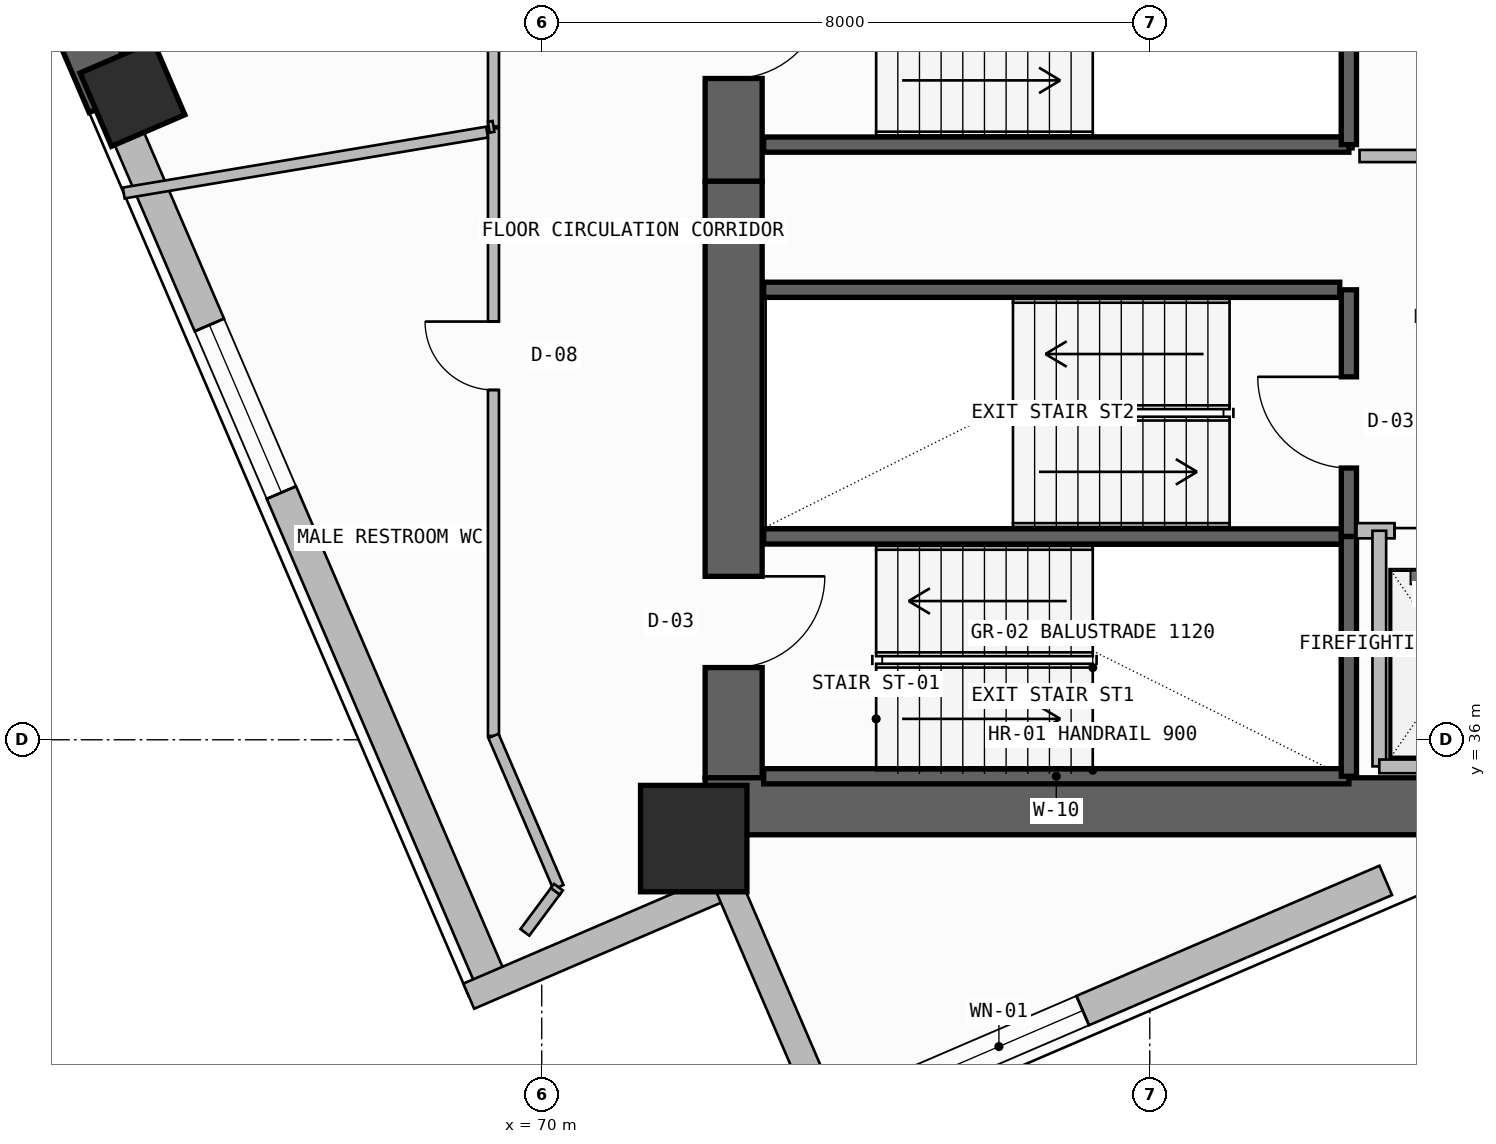
"""IFC4 building model, lengths in metres.
Left out: names, types, materials, properties, quantities, classifications, styles, units other than length and angle.
Written with IfcOpenShell. Run it as: python <this file> out.ifc"""

import sys

from ifc_helpers import new_model, si_unit, direction, frame, frame_2d, origin, origin_2d, place, context, subcontext, project, spatial, rectangle, extrude, element, fill, save


model = new_model("IFC4")
c1 = context("Model", 3, precision=1e-05, world=origin(), true_north=direction((0.0, 1.0)))
c2 = subcontext(c1, "Body", "Model", "MODEL_VIEW")
j1 = project(units=[si_unit("LENGTHUNIT", "METRE"), si_unit("PLANEANGLEUNIT", "RADIAN")], contexts=[c1])
p1 = place(None, origin())
s1 = spatial("IfcSite", under=j1, at=p1, CompositionType="ELEMENT")
p2 = place(p1, origin())
s2 = spatial("IfcBuilding", under=s1, at=p2, CompositionType="ELEMENT")
p3 = place(p2, frame((0.0, 0.0, 175.5)))
s3 = spatial("IfcBuildingStorey", under=s2, at=p3, CompositionType="ELEMENT", Elevation=175.5)
p4 = place(p3, frame((72.525, 35.5, -0.26), z_axis=(0.0, 0.0, 1.0), x_axis=(0.0, 1.0, 0.0)))
e1 = element("IfcWall", 1, at=p4, inside=s3, PredefinedType="SHEAR", context=c2, shape_type="SweptSolid", body=[
    extrude(rectangle(XDim=7.85, YDim=0.75, at=frame_2d((3.925, 0.0))), origin(), (0.0, 0.0, 1.0), 3.6),
])
p5 = place(p4, frame((1.45, 0.0, 0.26)))
e2 = element("IfcOpeningElement", 2, at=p5, cuts=e1, PredefinedType="OPENING", context=c2, shape_type="SweptSolid", body=[
    extrude(rectangle(XDim=1.2, YDim=2.2, at=frame_2d((0.6, 1.1))), frame((0.0, 0.385, 0.0), z_axis=(0.0, -1.0, 0.0), x_axis=(1.0, 0.0, 0.0)), (0.0, 0.0, 1.0), 0.77),
])
p6 = place(p3, frame((72.15, 35.125, -0.26), z_axis=(0.0, 0.0, 1.0), x_axis=(1.0, 0.0, 0.0)))
e3 = element("IfcWall", 3, at=p6, inside=s3, PredefinedType="SHEAR", context=c2, shape_type="SweptSolid", body=[
    extrude(rectangle(XDim=13.6, YDim=0.75, at=frame_2d((6.8, 0.0))), origin(), (0.0, 0.0, 1.0), 3.6),
])
p7 = place(p3, frame((72.525, 43.35, -0.26), z_axis=(0.0, 0.0, 1.0), x_axis=(0.0, 1.0, 0.0)))
e4 = element("IfcWall", 4, at=p7, inside=s3, PredefinedType="SHEAR", context=c2, shape_type="SweptSolid", body=[
    extrude(rectangle(XDim=12.7, YDim=0.75, at=frame_2d((6.35, 0.0))), origin(), (0.0, 0.0, 1.0), 3.6),
])
p8 = place(p7, frame((1.35, 0.0, 0.26)))
e5 = element("IfcOpeningElement", 5, at=p8, cuts=e4, PredefinedType="OPENING", context=c2, shape_type="SweptSolid", body=[
    extrude(rectangle(XDim=1.2, YDim=2.2, at=frame_2d((0.6, 1.1))), frame((0.0, 0.385, 0.0), z_axis=(0.0, -1.0, 0.0), x_axis=(1.0, 0.0, 0.0)), (0.0, 0.0, 1.0), 0.77),
])
p9 = place(p3, frame((72.0, 34.7, 0.0), z_axis=(0.0, 0.0, 1.0), x_axis=(1.0, 0.0, 0.0)))
e6 = element("IfcColumn", 6, at=p9, inside=s3, PredefinedType="COLUMN", context=c2, shape_type="SweptSolid", body=[
    extrude(rectangle(XDim=1.4, YDim=1.4, at=origin_2d()), origin(), (0.0, 0.0, 1.0), 3.6),
])
p10 = place(p3, frame((64.615, 44.498, 0.0), z_axis=(0.0, 0.0, 1.0), x_axis=(-0.394743856384, 0.918791210149, 0.0)))
e7 = element("IfcColumn", 7, at=p10, inside=s3, PredefinedType="COLUMN", context=c2, shape_type="SweptSolid", body=[
    extrude(rectangle(XDim=1.05, YDim=1.05, at=origin_2d()), origin(), (0.0, 0.0, 1.0), 3.6),
])
p11 = place(p3, frame((73.779, 31.003, 0.0), z_axis=(0.0, 0.0, 1.0), x_axis=(0.918797817688, 0.394728476565, 0.0)))
e8 = element("IfcWall", 8, at=p11, inside=s3, PredefinedType="SOLIDWALL", context=c2, shape_type="SweptSolid", body=[
    extrude(rectangle(XDim=7.973, YDim=0.42, at=frame_2d((3.987, 0.0))), origin(), (0.0, 0.0, 1.0), 3.34),
])
p12 = place(p11, frame((1.234, 0.0, 1.2)))
e9 = element("IfcOpeningElement", 9, at=p12, cuts=e8, PredefinedType="OPENING", context=c2, shape_type="SweptSolid", body=[
    extrude(rectangle(XDim=2.4, YDim=0.9, at=frame_2d((1.2, 0.45))), frame((0.0, 0.22, 0.0), z_axis=(0.0, -1.0, 0.0), x_axis=(1.0, 0.0, 0.0)), (0.0, 0.0, 1.0), 0.44),
])
p13 = place(p3, frame((56.728, 62.172, -0.26), z_axis=(0.0, 0.0, 1.0), x_axis=(0.394736752992, -0.918794261974, 0.0)))
e10 = element("IfcWall", 10, at=p13, inside=s3, PredefinedType="SHEAR", context=c2, shape_type="SweptSolid", body=[
    extrude(rectangle(XDim=19.353, YDim=0.7, at=frame_2d((9.676, 0.0))), origin(), (0.0, 0.0, 1.0), 3.6),
])
p14 = place(p13, frame((7.747, 0.0, 1.2)))
e11 = element("IfcOpeningElement", 11, at=p14, cuts=e10, PredefinedType="OPENING", context=c2, shape_type="SweptSolid", body=[
    extrude(rectangle(XDim=2.4, YDim=0.9, at=frame_2d((1.2, 0.45))), frame((0.0, 0.36, 0.0), z_axis=(0.0, -1.0, 0.0), x_axis=(1.0, 0.0, 0.0)), (0.0, 0.0, 1.0), 0.72),
])
p15 = place(p3, frame((64.367, 44.391, 0.0), z_axis=(0.0, 0.0, 1.0), x_axis=(0.394757430431, -0.918785378159, 0.0)))
e12 = element("IfcWall", 12, at=p15, inside=s3, PredefinedType="SOLIDWALL", context=c2, shape_type="SweptSolid", body=[
    extrude(rectangle(XDim=12.654, YDim=0.42, at=frame_2d((6.327, 0.0))), origin(), (0.0, 0.0, 1.0), 2.725),
])
p16 = place(p15, frame((3.193, 0.0, 1.2)))
e13 = element("IfcOpeningElement", 13, at=p16, cuts=e12, PredefinedType="OPENING", context=c2, shape_type="SweptSolid", body=[
    extrude(rectangle(XDim=2.4, YDim=0.9, at=frame_2d((1.2, 0.45))), frame((0.0, 0.22, 0.0), z_axis=(0.0, -1.0, 0.0), x_axis=(1.0, 0.0, 0.0)), (0.0, 0.0, 1.0), 0.44),
])
p17 = place(p3, frame((69.04, 32.627, 0.0), z_axis=(0.0, 0.0, 1.0), x_axis=(0.91879775808, 0.394728615312, 0.0)))
e14 = element("IfcWall", 14, at=p17, inside=s3, PredefinedType="SOLIDWALL", context=c2, shape_type="SweptSolid", body=[
    extrude(rectangle(XDim=3.713, YDim=0.36, at=frame_2d((1.856, 0.0))), origin(), (0.0, 0.0, 1.0), 3.34),
])
p18 = place(p3, frame((72.451, 34.092, 0.0), z_axis=(0.0, 0.0, 1.0), x_axis=(0.394752464447, -0.918787511786, 0.0)))
e15 = element("IfcWall", 15, at=p18, inside=s3, PredefinedType="SOLIDWALL", context=c2, shape_type="SweptSolid", body=[
    extrude(rectangle(XDim=3.713, YDim=0.36, at=frame_2d((1.856, 0.0))), origin(), (0.0, 0.0, 1.0), 3.34),
])
for number, where, z_axis, x_axis in (
    (16, (72.92, 35.52, -0.26), (0.0, 0.0, 1.0), (1.0, 0.0, 0.0)),
    (17, (72.92, 38.675, -0.26), (0.0, 0.0, 1.0), (1.0, 0.0, 0.0)),
):
    element("IfcWall", number, at=place(p3, frame(where, z_axis=z_axis, x_axis=x_axis)), inside=s3, PredefinedType="SOLIDWALL", context=c2, shape_type="SweptSolid", body=[
        extrude(rectangle(XDim=7.7, YDim=0.2, at=frame_2d((3.85, 0.0))), origin(), (0.0, 0.0, 1.0), 3.6),
    ])
p19 = place(p3, frame((80.62, 35.52, -0.26), z_axis=(0.0, 0.0, 1.0), x_axis=(0.0, 1.0, 0.0)))
e18 = element("IfcWall", 18, at=p19, inside=s3, PredefinedType="SOLIDWALL", context=c2, shape_type="SweptSolid", body=[
    extrude(rectangle(XDim=3.155, YDim=0.2, at=frame_2d((1.578, 0.0))), origin(), (0.0, 0.0, 1.0), 3.6),
])
p20 = place(p3, frame((80.62, 38.675, -0.26), z_axis=(0.0, 0.0, 1.0), x_axis=(0.0, 1.0, 0.0)))
e19 = element("IfcWall", 19, at=p20, inside=s3, PredefinedType="SOLIDWALL", context=c2, shape_type="SweptSolid", body=[
    extrude(rectangle(XDim=3.245, YDim=0.2, at=frame_2d((1.623, 0.0))), origin(), (0.0, 0.0, 1.0), 3.6),
])
p21 = place(p20, frame((0.9, 0.0, 0.26)))
e20 = element("IfcOpeningElement", 20, at=p21, cuts=e19, PredefinedType="OPENING", context=c2, shape_type="SweptSolid", body=[
    extrude(rectangle(XDim=1.2, YDim=2.2, at=frame_2d((0.6, 1.1))), frame((0.0, 0.11, 0.0), z_axis=(0.0, -1.0, 0.0), x_axis=(1.0, 0.0, 0.0)), (0.0, 0.0, 1.0), 0.22),
])
p22 = place(p3, frame((80.72, 38.75, 0.0), z_axis=(0.0, 0.0, 1.0), x_axis=(1.0, 0.0, 0.0)))
e21 = element("IfcWall", 21, at=p22, inside=s3, PredefinedType="SOLIDWALL", context=c2, shape_type="SweptSolid", body=[
    extrude(rectangle(XDim=4.26, YDim=0.2, at=frame_2d((2.13, 0.0))), origin(), (0.0, 0.0, 1.0), 3.34),
])
p23 = place(p22, frame((0.5, 0.0, 0.0)))
e22 = element("IfcOpeningElement", 22, at=p23, cuts=e21, PredefinedType="OPENING", context=c2, shape_type="SweptSolid", body=[
    extrude(rectangle(XDim=1.3, YDim=2.3, at=frame_2d((0.65, 1.15))), frame((0.0, 0.11, 0.0), z_axis=(0.0, -1.0, 0.0), x_axis=(1.0, 0.0, 0.0)), (0.0, 0.0, 1.0), 0.22),
])
p24 = place(p22, frame((2.45, 0.0, 0.0)))
e23 = element("IfcOpeningElement", 23, at=p24, cuts=e21, PredefinedType="OPENING", context=c2, shape_type="SweptSolid", body=[
    extrude(rectangle(XDim=1.3, YDim=2.3, at=frame_2d((0.65, 1.15))), frame((0.0, 0.11, 0.0), z_axis=(0.0, -1.0, 0.0), x_axis=(1.0, 0.0, 0.0)), (0.0, 0.0, 1.0), 0.22),
])
p25 = place(p3, frame((81.02, 35.65, 0.0), z_axis=(0.0, 0.0, 1.0), x_axis=(0.0, 1.0, 0.0)))
e24 = element("IfcWall", 24, at=p25, inside=s3, PredefinedType="SOLIDWALL", context=c2, shape_type="SweptSolid", body=[
    extrude(rectangle(XDim=3.1, YDim=0.18, at=frame_2d((1.55, 0.0))), origin(), (0.0, 0.0, 1.0), 3.34),
])
p26 = place(p3, frame((81.02, 35.65, 0.0), z_axis=(0.0, 0.0, 1.0), x_axis=(1.0, 0.0, 0.0)))
e25 = element("IfcWall", 25, at=p26, inside=s3, PredefinedType="SOLIDWALL", context=c2, shape_type="SweptSolid", body=[
    extrude(rectangle(XDim=3.93, YDim=0.18, at=frame_2d((1.965, 0.0))), origin(), (0.0, 0.0, 1.0), 3.34),
])
p27 = place(p3, frame((72.92, 41.92, -0.26), z_axis=(0.0, 0.0, 1.0), x_axis=(1.0, 0.0, 0.0)))
e26 = element("IfcWall", 26, at=p27, inside=s3, PredefinedType="SOLIDWALL", context=c2, shape_type="SweptSolid", body=[
    extrude(rectangle(XDim=7.58, YDim=0.2, at=frame_2d((3.79, 0.0))), origin(), (0.0, 0.0, 1.0), 3.6),
])
p28 = place(p3, frame((72.92, 43.83, -0.26), z_axis=(0.0, 0.0, 1.0), x_axis=(1.0, 0.0, 0.0)))
e27 = element("IfcWall", 27, at=p28, inside=s3, PredefinedType="SOLIDWALL", context=c2, shape_type="SweptSolid", body=[
    extrude(rectangle(XDim=7.7, YDim=0.2, at=frame_2d((3.85, 0.0))), origin(), (0.0, 0.0, 1.0), 3.6),
])
p29 = place(p3, frame((80.62, 43.83, -0.26), z_axis=(0.0, 0.0, 1.0), x_axis=(0.0, 1.0, 0.0)))
e28 = element("IfcWall", 28, at=p29, inside=s3, PredefinedType="SOLIDWALL", context=c2, shape_type="SweptSolid", body=[
    extrude(rectangle(XDim=3.24, YDim=0.2, at=frame_2d((1.62, 0.0))), origin(), (0.0, 0.0, 1.0), 3.6),
])
p30 = place(p3, frame((80.76, 43.68, 0.0), z_axis=(0.0, 0.0, 1.0), x_axis=(1.0, 0.0, 0.0)))
e29 = element("IfcWall", 29, at=p30, inside=s3, PredefinedType="PLUMBINGWALL", context=c2, shape_type="SweptSolid", body=[
    extrude(rectangle(XDim=4.19, YDim=0.16, at=frame_2d((2.095, 0.0))), origin(), (0.0, 0.0, 1.0), 3.34),
])
p31 = place(p3, frame((69.365, 44.045, 0.0), z_axis=(0.0, 0.0, 1.0), x_axis=(0.0, -1.0, 0.0)))
e30 = element("IfcWall", 30, at=p31, inside=s3, PredefinedType="PARTITIONING", context=c2, shape_type="SweptSolid", body=[
    extrude(rectangle(XDim=7.995, YDim=0.145, at=frame_2d((3.997, 0.0))), origin(), (0.0, 0.0, 1.0), 3.34),
])
p32 = place(p31, frame((2.543, 0.0, 0.0)))
e31 = element("IfcOpeningElement", 31, at=p32, cuts=e30, PredefinedType="OPENING", context=c2, shape_type="SweptSolid", body=[
    extrude(rectangle(XDim=0.9, YDim=2.1, at=frame_2d((0.45, 1.05))), frame((0.0, 0.083, 0.0), z_axis=(0.0, -1.0, 0.0), x_axis=(1.0, 0.0, 0.0)), (0.0, 0.0, 1.0), 0.165),
])
p33 = place(p3, frame((69.365, 36.051, 0.0), z_axis=(0.0, 0.0, 1.0), x_axis=(0.394735604248, -0.918794755503, 0.0)))
e32 = element("IfcWall", 32, at=p33, inside=s3, PredefinedType="PARTITIONING", context=c2, shape_type="SweptSolid", body=[
    extrude(rectangle(XDim=2.165, YDim=0.145, at=frame_2d((1.083, 0.0))), origin(), (0.0, 0.0, 1.0), 3.34),
])
p34 = place(p3, frame((70.22, 34.061, 0.0), z_axis=(0.0, 0.0, 1.0), x_axis=(-0.595480318094, -0.8033698966, 0.0)))
e33 = element("IfcWall", 33, at=p34, inside=s3, PredefinedType="PARTITIONING", context=c2, shape_type="SweptSolid", body=[
    extrude(rectangle(XDim=0.069, YDim=0.145, at=frame_2d((0.035, 0.0))), origin(), (0.0, 0.0, 1.0), 3.34),
])
p35 = place(p3, frame((64.5, 43.194, 0.0), z_axis=(0.0, 0.0, 1.0), x_axis=(0.986257448723, 0.165215752391, 0.0)))
e34 = element("IfcWall", 34, at=p35, inside=s3, PredefinedType="PARTITIONING", context=c2, shape_type="SweptSolid", body=[
    extrude(rectangle(XDim=4.847, YDim=0.145, at=frame_2d((2.423, 0.0))), origin(), (0.0, 0.0, 1.0), 3.34),
])
p36 = place(p3, frame((69.365, 48.265, 0.0), z_axis=(0.0, 0.0, 1.0), x_axis=(0.0, -1.0, 0.0)))
e35 = element("IfcWall", 35, at=p36, inside=s3, PredefinedType="PARTITIONING", context=c2, shape_type="SweptSolid", body=[
    extrude(rectangle(XDim=4.195, YDim=0.145, at=frame_2d((2.098, 0.0))), origin(), (0.0, 0.0, 1.0), 3.34),
])
p37 = place(p36, frame((1.648, 0.0, 0.0)))
e36 = element("IfcOpeningElement", 36, at=p37, cuts=e35, PredefinedType="OPENING", context=c2, shape_type="SweptSolid", body=[
    extrude(rectangle(XDim=0.9, YDim=2.1, at=frame_2d((0.45, 1.05))), frame((0.0, 0.083, 0.0), z_axis=(0.0, -1.0, 0.0), x_axis=(1.0, 0.0, 0.0)), (0.0, 0.0, 1.0), 0.165),
])
p38 = place(p3, frame((69.365, 44.069, 0.0), z_axis=(0.0, 0.0, 1.0), x_axis=(-0.987036848987, -0.160493796583, 0.0)))
e37 = element("IfcWall", 37, at=p38, inside=s3, PredefinedType="PARTITIONING", context=c2, shape_type="SweptSolid", body=[
    extrude(rectangle(XDim=0.061, YDim=0.145, at=frame_2d((0.03, 0.0))), origin(), (0.0, 0.0, 1.0), 3.34),
])
p39 = place(p3, frame((70.178, 34.005, 0.0), z_axis=(0.0, 0.0, 1.0), x_axis=(-0.596036058809, -0.802957667999, 0.0)))
e38 = element("IfcWall", 38, at=p39, inside=s3, PredefinedType="PARTITIONING", context=c2, shape_type="SweptSolid", body=[
    extrude(rectangle(XDim=0.671, YDim=0.145, at=frame_2d((0.336, 0.0))), origin(), (0.0, 0.0, 1.0), 3.34),
])
p40 = place(p12, origin())
e39 = element("IfcWindow", 39, at=p40, inside=s3, PartitioningType="SINGLE_PANEL", PredefinedType="WINDOW", context=c2, shape_type="SweptSolid", body=[
    extrude(rectangle(XDim=2.4, YDim=0.9, at=frame_2d((1.2, 0.45))), frame((0.0, 0.03, 0.0), z_axis=(0.0, -1.0, 0.0), x_axis=(1.0, 0.0, 0.0)), (0.0, 0.0, 1.0), 0.06),
])
fill(e9, e39)
p41 = place(p16, origin())
e40 = element("IfcWindow", 40, at=p41, inside=s3, PartitioningType="SINGLE_PANEL", PredefinedType="WINDOW", context=c2, shape_type="SweptSolid", body=[
    extrude(rectangle(XDim=2.4, YDim=0.9, at=frame_2d((1.2, 0.45))), frame((0.0, 0.03, 0.0), z_axis=(0.0, -1.0, 0.0), x_axis=(1.0, 0.0, 0.0)), (0.0, 0.0, 1.0), 0.06),
])
fill(e13, e40)
p42 = place(p5, frame((1.2, 0.0, 0.0), z_axis=(0.0, 0.0, 1.0), x_axis=(-1.0, 0.0, 0.0)))
e41 = element("IfcDoor", 41, at=p42, inside=s3, OperationType="SINGLE_SWING_LEFT", PredefinedType="USERDEFINED", context=c2, shape_type="SweptSolid", body=[
    extrude(rectangle(XDim=1.2, YDim=2.2, at=frame_2d((0.6, 1.1))), frame((0.0, 0.025, 0.0), z_axis=(0.0, -1.0, 0.0), x_axis=(1.0, 0.0, 0.0)), (0.0, 0.0, 1.0), 0.05),
])
fill(e2, e41)
p43 = place(p21, origin())
e42 = element("IfcDoor", 42, at=p43, inside=s3, OperationType="SINGLE_SWING_RIGHT", PredefinedType="USERDEFINED", context=c2, shape_type="SweptSolid", body=[
    extrude(rectangle(XDim=1.2, YDim=2.2, at=frame_2d((0.6, 1.1))), frame((0.0, 0.025, 0.0), z_axis=(0.0, -1.0, 0.0), x_axis=(1.0, 0.0, 0.0)), (0.0, 0.0, 1.0), 0.05),
])
fill(e20, e42)
p44 = place(p23, origin())
e43 = element("IfcDoor", 43, at=p44, inside=s3, OperationType="DOUBLE_DOOR_SLIDING", PredefinedType="DOOR", context=c2, shape_type="SweptSolid", body=[
    extrude(rectangle(XDim=1.3, YDim=2.3, at=frame_2d((0.65, 1.15))), frame((0.0, 0.025, 0.0), z_axis=(0.0, -1.0, 0.0), x_axis=(1.0, 0.0, 0.0)), (0.0, 0.0, 1.0), 0.05),
])
fill(e22, e43)
p45 = place(p8, frame((1.2, 0.0, 0.0), z_axis=(0.0, 0.0, 1.0), x_axis=(-1.0, 0.0, 0.0)))
e44 = element("IfcDoor", 44, at=p45, inside=s3, OperationType="SINGLE_SWING_LEFT", PredefinedType="USERDEFINED", context=c2, shape_type="SweptSolid", body=[
    extrude(rectangle(XDim=1.2, YDim=2.2, at=frame_2d((0.6, 1.1))), frame((0.0, 0.025, 0.0), z_axis=(0.0, -1.0, 0.0), x_axis=(1.0, 0.0, 0.0)), (0.0, 0.0, 1.0), 0.05),
])
fill(e5, e44)
p46 = place(p32, frame((0.9, 0.0, 0.0), z_axis=(0.0, 0.0, 1.0), x_axis=(-1.0, 0.0, 0.0)))
e45 = element("IfcDoor", 45, at=p46, inside=s3, OperationType="SINGLE_SWING_RIGHT", PredefinedType="DOOR", context=c2, shape_type="SweptSolid", body=[
    extrude(rectangle(XDim=0.9, YDim=2.1, at=frame_2d((0.45, 1.05))), frame((0.0, 0.025, 0.0), z_axis=(0.0, -1.0, 0.0), x_axis=(1.0, 0.0, 0.0)), (0.0, 0.0, 1.0), 0.05),
])
fill(e31, e45)
save(model, sys.argv[1])
